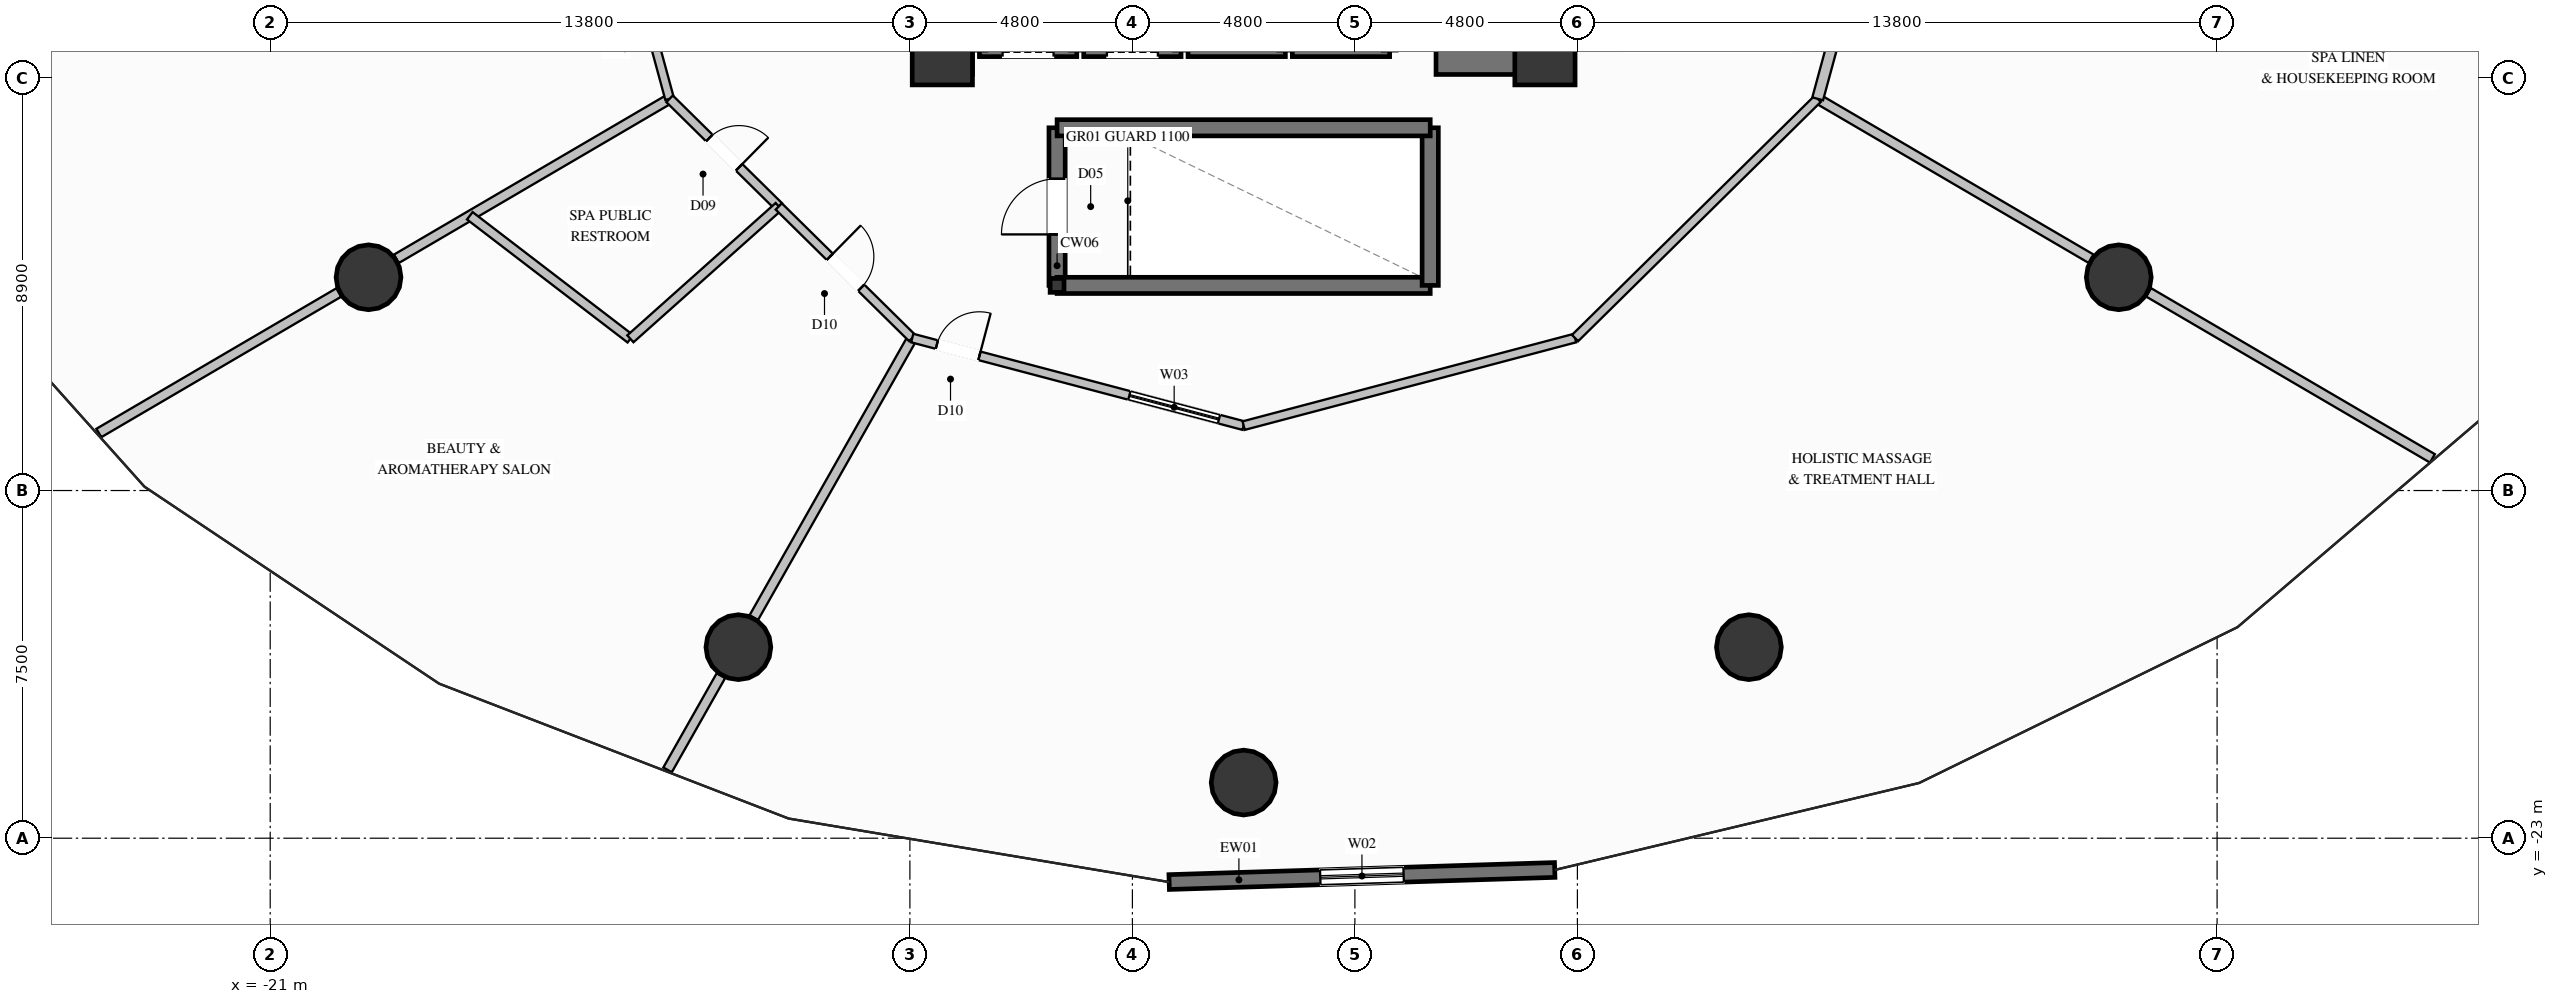
"""IFC4 building model, lengths in metres.
Left out: names, types, materials, properties, quantities, classifications, styles, units other than length and angle.
Written with IfcOpenShell. Run it as: python <this file> out.ifc"""

import sys

from ifc_helpers import new_model, si_unit, direction, frame, frame_2d, origin, origin_2d, place, context, subcontext, project, spatial, rectangle, hollow_rectangle, circle, extrude, element, fill, save


model = new_model("IFC4")
c1 = context("Model", 3, precision=1e-05, world=origin(), true_north=direction((0.0, 1.0)))
c2 = subcontext(c1, "Body", "Model", "MODEL_VIEW")
j1 = project(units=[si_unit("LENGTHUNIT", "METRE"), si_unit("PLANEANGLEUNIT", "RADIAN")], contexts=[c1])
p1 = place(None, origin())
s1 = spatial("IfcSite", under=j1, at=p1, CompositionType="ELEMENT")
p2 = place(p1, origin())
s2 = spatial("IfcBuilding", under=s1, at=p2, CompositionType="ELEMENT")
p3 = place(p2, frame((0.0, 0.0, 23.6)))
s3 = spatial("IfcBuildingStorey", under=s2, at=p3, CompositionType="ELEMENT", Elevation=23.6)
for number, where, z_axis, x_axis in (
    (1, (-6.5, -6.1, 0.0), (0.0, 0.0, 1.0), (1.0, 0.0, 0.0)),
    (2, (6.5, -6.1, 0.0), (0.0, 0.0, 1.0), (1.0, 0.0, 0.0)),
):
    element("IfcColumn", number, at=place(p3, frame(where, z_axis=z_axis, x_axis=x_axis)), inside=s3, PredefinedType="COLUMN", context=c2, shape_type="SweptSolid", body=[
        extrude(rectangle(XDim=1.3, YDim=1.3, at=origin_2d()), origin(), (0.0, 0.0, 1.0), 4.8),
    ])
p4 = place(p3, frame((-6.075, -6.1, 0.0), z_axis=(0.0, 0.0, 1.0), x_axis=(1.0, 0.0, 0.0)))
e3 = element("IfcWall", 3, at=p4, inside=s3, PredefinedType="SHEAR", context=c2, shape_type="SweptSolid", body=[
    extrude(rectangle(XDim=0.225, YDim=0.85, at=frame_2d((0.112, 0.0))), origin(), (0.0, 0.0, 1.0), 4.8),
])
p5 = place(p3, frame((4.15, -6.1, 0.0), z_axis=(0.0, 0.0, 1.0), x_axis=(1.0, 0.0, 0.0)))
e4 = element("IfcWall", 4, at=p5, inside=s3, PredefinedType="SHEAR", context=c2, shape_type="SweptSolid", body=[
    extrude(rectangle(XDim=1.925, YDim=0.85, at=frame_2d((0.962, 0.0))), origin(), (0.0, 0.0, 1.0), 4.8),
])
p6 = place(p3, frame((-6.5, -6.525, 0.0), z_axis=(0.0, 0.0, 1.0), x_axis=(0.0, 1.0, 0.0)))
e5 = element("IfcWall", 5, at=p6, inside=s3, PredefinedType="SHEAR", context=c2, shape_type="SweptSolid", body=[
    extrude(rectangle(XDim=3.175, YDim=0.85, at=frame_2d((1.587, 0.0))), origin(), (0.0, 0.0, 1.0), 4.8),
])
p7 = place(p3, frame((6.5, -6.525, 0.0), z_axis=(0.0, 0.0, 1.0), x_axis=(0.0, 1.0, 0.0)))
e6 = element("IfcWall", 6, at=p7, inside=s3, PredefinedType="SHEAR", context=c2, shape_type="SweptSolid", body=[
    extrude(rectangle(XDim=4.175, YDim=0.85, at=frame_2d((2.087, 0.0))), origin(), (0.0, 0.0, 1.0), 4.8),
])
p8 = place(p3, frame((-4.025, -11.075, 0.0), z_axis=(0.0, 0.0, 1.0), x_axis=(1.0, 0.0, 0.0)))
e7 = element("IfcColumn", 7, at=p8, inside=s3, PredefinedType="COLUMN", context=c2, shape_type="SweptSolid", body=[
    extrude(hollow_rectangle(XDim=0.3, YDim=0.3, WallThickness=0.016, at=origin_2d()), origin(), (0.0, 0.0, 1.0), 4.8),
])
for number, where, z_axis, x_axis in (
    (8, (-18.879, -10.9, 0.0), (0.0, 0.0, 1.0), (1.0, 0.0, 0.0)),
    (9, (-10.9, -18.879, 0.0), (0.0, 0.0, 1.0), (1.0, 0.0, 0.0)),
    (10, (0.0, -21.8, 0.0), (0.0, 0.0, 1.0), (1.0, 0.0, 0.0)),
    (11, (10.9, -18.879, 0.0), (0.0, 0.0, 1.0), (1.0, 0.0, 0.0)),
    (12, (18.879, -10.9, 0.0), (0.0, 0.0, 1.0), (1.0, 0.0, 0.0)),
):
    element("IfcColumn", number, at=place(p3, frame(where, z_axis=z_axis, x_axis=x_axis)), inside=s3, PredefinedType="COLUMN", context=c2, shape_type="SweptSolid", body=[
        extrude(circle(Radius=0.7, at=origin_2d()), origin(), (0.0, 0.0, 1.0), 4.8),
    ])
p9 = place(p3, frame((6.711, -23.685, 0.0), z_axis=(0.0, 0.0, 1.0), x_axis=(-0.999508118347, -0.031361144071, 0.0)))
e13 = element("IfcWall", 13, at=p9, inside=s3, PredefinedType="SOLIDWALL", context=c2, shape_type="SweptSolid", body=[
    extrude(rectangle(XDim=8.322, YDim=0.32, at=frame_2d((4.161, 0.0))), origin(), (0.0, 0.0, 1.0), 4.54),
])
p10 = place(p9, frame((3.261, 0.0, 0.65)))
e14 = element("IfcOpeningElement", 14, at=p10, cuts=e13, PredefinedType="OPENING", context=c2, shape_type="SweptSolid", body=[
    extrude(rectangle(XDim=1.8, YDim=2.6, at=frame_2d((0.9, 1.3))), frame((0.0, 0.17, 0.0), z_axis=(0.0, -1.0, 0.0), x_axis=(1.0, 0.0, 0.0)), (0.0, 0.0, 1.0), 0.34),
])
p11 = place(p3, frame((-5.7, -6.0, 0.0), z_axis=(0.0, 0.0, 1.0), x_axis=(1.0, 0.0, 0.0)))
e15 = element("IfcWall", 15, at=p11, inside=s3, PredefinedType="SOLIDWALL", context=c2, shape_type="SweptSolid", body=[
    extrude(rectangle(XDim=2.1, YDim=0.28, at=frame_2d((1.05, 0.0))), origin(), (0.0, 0.0, 1.0), 4.54),
])
p12 = place(p11, frame((0.5, 0.0, 0.0)))
e16 = element("IfcOpeningElement", 16, at=p12, cuts=e15, PredefinedType="OPENING", context=c2, shape_type="SweptSolid", body=[
    extrude(rectangle(XDim=1.1, YDim=2.2, at=frame_2d((0.55, 1.1))), frame((0.0, 0.15, 0.0), z_axis=(0.0, -1.0, 0.0), x_axis=(1.0, 0.0, 0.0)), (0.0, 0.0, 1.0), 0.3),
])
p13 = place(p3, frame((-3.45, -6.0, 0.0), z_axis=(0.0, 0.0, 1.0), x_axis=(1.0, 0.0, 0.0)))
e17 = element("IfcWall", 17, at=p13, inside=s3, PredefinedType="SOLIDWALL", context=c2, shape_type="SweptSolid", body=[
    extrude(rectangle(XDim=2.1, YDim=0.28, at=frame_2d((1.05, 0.0))), origin(), (0.0, 0.0, 1.0), 4.54),
])
p14 = place(p13, frame((0.5, 0.0, 0.0)))
e18 = element("IfcOpeningElement", 18, at=p14, cuts=e17, PredefinedType="OPENING", context=c2, shape_type="SweptSolid", body=[
    extrude(rectangle(XDim=1.1, YDim=2.2, at=frame_2d((0.55, 1.1))), frame((0.0, 0.15, 0.0), z_axis=(0.0, -1.0, 0.0), x_axis=(1.0, 0.0, 0.0)), (0.0, 0.0, 1.0), 0.3),
])
for number, where, z_axis, x_axis in (
    (19, (-1.2, -6.0, 0.0), (0.0, 0.0, 1.0), (1.0, 0.0, 0.0)),
    (20, (1.05, -6.0, 0.0), (0.0, 0.0, 1.0), (1.0, 0.0, 0.0)),
):
    element("IfcWall", number, at=place(p3, frame(where, z_axis=z_axis, x_axis=x_axis)), inside=s3, PredefinedType="SOLIDWALL", context=c2, shape_type="SweptSolid", body=[
        extrude(rectangle(XDim=2.1, YDim=0.28, at=frame_2d((1.05, 0.0))), origin(), (0.0, 0.0, 1.0), 4.54),
    ])
p15 = place(p3, frame((-4.025, -11.075, 0.0), z_axis=(0.0, 0.0, 1.0), x_axis=(0.0, 1.0, 0.0)))
e21 = element("IfcWall", 21, at=p15, inside=s3, PredefinedType="SOLIDWALL", context=c2, shape_type="SweptSolid", body=[
    extrude(rectangle(XDim=3.4, YDim=0.35, at=frame_2d((1.7, 0.0))), origin(), (0.0, 0.0, 1.0), 4.54),
])
p16 = place(p15, frame((1.1, 0.0, 0.0)))
e22 = element("IfcOpeningElement", 22, at=p16, cuts=e21, PredefinedType="OPENING", context=c2, shape_type="SweptSolid", body=[
    extrude(rectangle(XDim=1.2, YDim=2.2, at=frame_2d((0.6, 1.1))), frame((0.0, 0.185, 0.0), z_axis=(0.0, -1.0, 0.0), x_axis=(1.0, 0.0, 0.0)), (0.0, 0.0, 1.0), 0.37),
])
p17 = place(p3, frame((-4.025, -11.075, 0.0), z_axis=(0.0, 0.0, 1.0), x_axis=(1.0, 0.0, 0.0)))
e23 = element("IfcWall", 23, at=p17, inside=s3, PredefinedType="SOLIDWALL", context=c2, shape_type="SweptSolid", body=[
    extrude(rectangle(XDim=8.05, YDim=0.35, at=frame_2d((4.025, 0.0))), origin(), (0.0, 0.0, 1.0), 4.54),
])
p18 = place(p3, frame((4.025, -11.075, 0.0), z_axis=(0.0, 0.0, 1.0), x_axis=(0.0, 1.0, 0.0)))
e24 = element("IfcWall", 24, at=p18, inside=s3, PredefinedType="SOLIDWALL", context=c2, shape_type="SweptSolid", body=[
    extrude(rectangle(XDim=3.4, YDim=0.35, at=frame_2d((1.7, 0.0))), origin(), (0.0, 0.0, 1.0), 4.54),
])
p19 = place(p3, frame((4.025, -7.675, 0.0), z_axis=(0.0, 0.0, 1.0), x_axis=(-1.0, 0.0, 0.0)))
e25 = element("IfcWall", 25, at=p19, inside=s3, PredefinedType="SOLIDWALL", context=c2, shape_type="SweptSolid", body=[
    extrude(rectangle(XDim=8.05, YDim=0.35, at=frame_2d((4.025, 0.0))), origin(), (0.0, 0.0, 1.0), 4.54),
])
p20 = place(p3, frame((-12.384, -7.05, 0.0), z_axis=(0.0, 0.0, 1.0), x_axis=(-0.862940354658, -0.505305792865, 0.0)))
e26 = element("IfcWall", 26, at=p20, inside=s3, PredefinedType="PARTITIONING", context=c2, shape_type="SweptSolid", body=[
    extrude(rectangle(XDim=6.831, YDim=0.21, at=frame_2d((3.416, 0.0))), origin(), (0.0, 0.0, 1.0), 2.725),
])
p21 = place(p3, frame((-19.52, -11.228, 0.0), z_axis=(0.0, 0.0, 1.0), x_axis=(-0.862973355077, -0.505249431892, 0.0)))
e27 = element("IfcWall", 27, at=p21, inside=s3, PredefinedType="PARTITIONING", context=c2, shape_type="SweptSolid", body=[
    extrude(rectangle(XDim=5.999, YDim=0.21, at=frame_2d((3.0, 0.0))), origin(), (0.0, 0.0, 1.0), 4.54),
])
p22 = place(p3, frame((-7.15, -12.211, 0.0), z_axis=(0.0, 0.0, 1.0), x_axis=(-0.493009905658, -0.87002369676, 0.0)))
e28 = element("IfcWall", 28, at=p22, inside=s3, PredefinedType="PARTITIONING", context=c2, shape_type="SweptSolid", body=[
    extrude(rectangle(XDim=6.931, YDim=0.21, at=frame_2d((3.465, 0.0))), origin(), (0.0, 0.0, 1.0), 2.725),
])
p23 = place(p3, frame((-11.276, -19.493, 0.0), z_axis=(0.0, 0.0, 1.0), x_axis=(-0.493041569547, -0.870005753256, 0.0)))
e29 = element("IfcWall", 29, at=p23, inside=s3, PredefinedType="PARTITIONING", context=c2, shape_type="SweptSolid", body=[
    extrude(rectangle(XDim=2.337, YDim=0.21, at=frame_2d((1.168, 0.0))), origin(), (0.0, 0.0, 1.0), 4.54),
])
p24 = place(p3, frame((12.384, -7.05, 0.0), z_axis=(0.0, 0.0, 1.0), x_axis=(0.863200238908, -0.504861711313, 0.0)))
e30 = element("IfcWall", 30, at=p24, inside=s3, PredefinedType="PARTITIONING", context=c2, shape_type="SweptSolid", body=[
    extrude(rectangle(XDim=6.832, YDim=0.21, at=frame_2d((3.416, 0.0))), origin(), (0.0, 0.0, 1.0), 2.725),
])
p25 = place(p3, frame((19.522, -11.225, 0.0), z_axis=(0.0, 0.0, 1.0), x_axis=(0.863224110389, -0.504820894222, 0.0)))
e31 = element("IfcWall", 31, at=p25, inside=s3, PredefinedType="PARTITIONING", context=c2, shape_type="SweptSolid", body=[
    extrude(rectangle(XDim=7.093, YDim=0.21, at=frame_2d((3.547, 0.0))), origin(), (0.0, 0.0, 1.0), 4.54),
])
p26 = place(p3, frame((-13.438, -3.172, 0.0), z_axis=(0.0, 0.0, 1.0), x_axis=(0.262269103922, -0.9649947757, 0.0)))
e32 = element("IfcWall", 32, at=p26, inside=s3, PredefinedType="PARTITIONING", context=c2, shape_type="SweptSolid", body=[
    extrude(rectangle(XDim=4.019, YDim=0.19, at=frame_2d((2.009, 0.0))), origin(), (0.0, 0.0, 1.0), 4.54),
])
p27 = place(p26, frame((1.534, 0.0, 0.0)))
e33 = element("IfcOpeningElement", 33, at=p27, cuts=e32, PredefinedType="OPENING", context=c2, shape_type="SweptSolid", body=[
    extrude(rectangle(XDim=0.95, YDim=2.1, at=frame_2d((0.475, 1.05))), frame((0.0, 0.105, 0.0), z_axis=(0.0, -1.0, 0.0), x_axis=(1.0, 0.0, 0.0)), (0.0, 0.0, 1.0), 0.21),
])
p28 = place(p3, frame((-12.384, -7.05, 0.0), z_axis=(0.0, 0.0, 1.0), x_axis=(0.712072104827, -0.70210634346, 0.0)))
e34 = element("IfcWall", 34, at=p28, inside=s3, PredefinedType="PLUMBINGWALL", context=c2, shape_type="SweptSolid", body=[
    extrude(rectangle(XDim=3.307, YDim=0.2, at=frame_2d((1.654, 0.0))), origin(), (0.0, 0.0, 1.0), 4.54),
])
p29 = place(p28, frame((1.204, 0.0, 0.0)))
e35 = element("IfcOpeningElement", 35, at=p29, cuts=e34, PredefinedType="OPENING", context=c2, shape_type="SweptSolid", body=[
    extrude(rectangle(XDim=0.9, YDim=2.1, at=frame_2d((0.45, 1.05))), frame((0.0, 0.11, 0.0), z_axis=(0.0, -1.0, 0.0), x_axis=(1.0, 0.0, 0.0)), (0.0, 0.0, 1.0), 0.22),
])
p30 = place(p3, frame((-16.694, -9.573, 0.0), z_axis=(0.0, 0.0, 1.0), x_axis=(0.79380171633, -0.608176647983, 0.0)))
e36 = element("IfcWall", 36, at=p30, inside=s3, PredefinedType="PLUMBINGWALL", context=c2, shape_type="SweptSolid", body=[
    extrude(rectangle(XDim=4.364, YDim=0.2, at=frame_2d((2.182, 0.0))), origin(), (0.0, 0.0, 1.0), 4.54),
])
p31 = place(p3, frame((-10.029, -9.372, 0.0), z_axis=(0.0, 0.0, 1.0), x_axis=(-0.746283971534, -0.665627699117, 0.0)))
e37 = element("IfcWall", 37, at=p31, inside=s3, PredefinedType="PLUMBINGWALL", context=c2, shape_type="SweptSolid", body=[
    extrude(rectangle(XDim=4.289, YDim=0.2, at=frame_2d((2.145, 0.0))), origin(), (0.0, 0.0, 1.0), 4.54),
])
p32 = place(p3, frame((-10.029, -9.372, 0.0), z_axis=(0.0, 0.0, 1.0), x_axis=(0.712070649597, -0.702107819343, 0.0)))
e38 = element("IfcWall", 38, at=p32, inside=s3, PredefinedType="PARTITIONING", context=c2, shape_type="SweptSolid", body=[
    extrude(rectangle(XDim=4.043, YDim=0.19, at=frame_2d((2.022, 0.0))), origin(), (0.0, 0.0, 1.0), 4.54),
])
p33 = place(p32, frame((1.547, 0.0, 0.0)))
e39 = element("IfcOpeningElement", 39, at=p33, cuts=e38, PredefinedType="OPENING", context=c2, shape_type="SweptSolid", body=[
    extrude(rectangle(XDim=0.95, YDim=2.1, at=frame_2d((0.475, 1.05))), frame((0.0, 0.105, 0.0), z_axis=(0.0, -1.0, 0.0), x_axis=(1.0, 0.0, 0.0)), (0.0, 0.0, 1.0), 0.21),
])
p34 = place(p3, frame((-7.15, -12.211, 0.0), z_axis=(0.0, 0.0, 1.0), x_axis=(0.966820901533, -0.255455170937, 0.0)))
e40 = element("IfcWall", 40, at=p34, inside=s3, PredefinedType="PARTITIONING", context=c2, shape_type="SweptSolid", body=[
    extrude(rectangle(XDim=7.395, YDim=0.19, at=frame_2d((3.698, 0.0))), origin(), (0.0, 0.0, 1.0), 4.54),
])
p35 = place(p34, frame((0.55, 0.0, 0.0)))
e41 = element("IfcOpeningElement", 41, at=p35, cuts=e40, PredefinedType="OPENING", context=c2, shape_type="SweptSolid", body=[
    extrude(rectangle(XDim=0.95, YDim=2.1, at=frame_2d((0.475, 1.05))), frame((0.0, 0.105, 0.0), z_axis=(0.0, -1.0, 0.0), x_axis=(1.0, 0.0, 0.0)), (0.0, 0.0, 1.0), 0.21),
])
p36 = place(p34, frame((4.845, 0.0, 0.9)))
e42 = element("IfcOpeningElement", 42, at=p36, cuts=e40, PredefinedType="OPENING", context=c2, shape_type="SweptSolid", body=[
    extrude(rectangle(XDim=2.0, YDim=1.6, at=frame_2d((1.0, 0.8))), frame((0.0, 0.105, 0.0), z_axis=(0.0, -1.0, 0.0), x_axis=(1.0, 0.0, 0.0)), (0.0, 0.0, 1.0), 0.21),
])
p37 = place(p3, frame((0.0, -14.1, 0.0), z_axis=(0.0, 0.0, 1.0), x_axis=(0.966820901533, 0.255455170937, 0.0)))
e43 = element("IfcWall", 43, at=p37, inside=s3, PredefinedType="PARTITIONING", context=c2, shape_type="SweptSolid", body=[
    extrude(rectangle(XDim=7.395, YDim=0.19, at=frame_2d((3.698, 0.0))), origin(), (0.0, 0.0, 1.0), 4.54),
])
p38 = place(p3, frame((7.15, -12.211, 0.0), z_axis=(0.0, 0.0, 1.0), x_axis=(0.712071304345, 0.702107155303, 0.0)))
e44 = element("IfcWall", 44, at=p38, inside=s3, PredefinedType="PARTITIONING", context=c2, shape_type="SweptSolid", body=[
    extrude(rectangle(XDim=7.351, YDim=0.19, at=frame_2d((3.675, 0.0))), origin(), (0.0, 0.0, 1.0), 4.54),
])
p39 = place(p3, frame((12.384, -7.05, 0.0), z_axis=(0.0, 0.0, 1.0), x_axis=(0.262260528785, 0.964997106235, 0.0)))
e45 = element("IfcWall", 45, at=p39, inside=s3, PredefinedType="PARTITIONING", context=c2, shape_type="SweptSolid", body=[
    extrude(rectangle(XDim=7.306, YDim=0.24, at=frame_2d((3.653, 0.0))), origin(), (0.0, 0.0, 1.0), 4.54),
])
p40 = place(p39, frame((3.178, 0.0, 0.0)))
e46 = element("IfcOpeningElement", 46, at=p40, cuts=e45, PredefinedType="OPENING", context=c2, shape_type="SweptSolid", body=[
    extrude(rectangle(XDim=0.95, YDim=2.1, at=frame_2d((0.475, 1.05))), frame((0.0, 0.13, 0.0), z_axis=(0.0, -1.0, 0.0), x_axis=(1.0, 0.0, 0.0)), (0.0, 0.0, 1.0), 0.26),
])
p41 = place(p10, origin())
e47 = element("IfcWindow", 47, at=p41, inside=s3, PartitioningType="SINGLE_PANEL", PredefinedType="WINDOW", context=c2, shape_type="SweptSolid", body=[
    extrude(rectangle(XDim=1.8, YDim=2.6, at=frame_2d((0.9, 1.3))), frame((0.0, 0.03, 0.0), z_axis=(0.0, -1.0, 0.0), x_axis=(1.0, 0.0, 0.0)), (0.0, 0.0, 1.0), 0.06),
])
fill(e14, e47)
p42 = place(p16, origin())
e48 = element("IfcDoor", 48, at=p42, inside=s3, OperationType="SINGLE_SWING_LEFT", PredefinedType="DOOR", context=c2, shape_type="SweptSolid", body=[
    extrude(rectangle(XDim=1.2, YDim=2.2, at=frame_2d((0.6, 1.1))), frame((0.0, 0.025, 0.0), z_axis=(0.0, -1.0, 0.0), x_axis=(1.0, 0.0, 0.0)), (0.0, 0.0, 1.0), 0.05),
])
fill(e22, e48)
p43 = place(p29, origin())
e49 = element("IfcDoor", 49, at=p43, inside=s3, OperationType="SINGLE_SWING_RIGHT", PredefinedType="DOOR", context=c2, shape_type="SweptSolid", body=[
    extrude(rectangle(XDim=0.9, YDim=2.1, at=frame_2d((0.45, 1.05))), frame((0.0, 0.025, 0.0), z_axis=(0.0, -1.0, 0.0), x_axis=(1.0, 0.0, 0.0)), (0.0, 0.0, 1.0), 0.05),
])
fill(e35, e49)
p44 = place(p33, origin())
e50 = element("IfcDoor", 50, at=p44, inside=s3, OperationType="SINGLE_SWING_LEFT", PredefinedType="DOOR", context=c2, shape_type="SweptSolid", body=[
    extrude(rectangle(XDim=0.95, YDim=2.1, at=frame_2d((0.475, 1.05))), frame((0.0, 0.025, 0.0), z_axis=(0.0, -1.0, 0.0), x_axis=(1.0, 0.0, 0.0)), (0.0, 0.0, 1.0), 0.05),
])
fill(e39, e50)
p45 = place(p35, origin())
e51 = element("IfcDoor", 51, at=p45, inside=s3, OperationType="SINGLE_SWING_RIGHT", PredefinedType="DOOR", context=c2, shape_type="SweptSolid", body=[
    extrude(rectangle(XDim=0.95, YDim=2.1, at=frame_2d((0.475, 1.05))), frame((0.0, 0.025, 0.0), z_axis=(0.0, -1.0, 0.0), x_axis=(1.0, 0.0, 0.0)), (0.0, 0.0, 1.0), 0.05),
])
fill(e41, e51)
p46 = place(p36, origin())
e52 = element("IfcWindow", 52, at=p46, inside=s3, PartitioningType="SINGLE_PANEL", PredefinedType="WINDOW", context=c2, shape_type="SweptSolid", body=[
    extrude(rectangle(XDim=2.0, YDim=1.6, at=frame_2d((1.0, 0.8))), frame((0.0, 0.03, 0.0), z_axis=(0.0, -1.0, 0.0), x_axis=(1.0, 0.0, 0.0)), (0.0, 0.0, 1.0), 0.06),
])
fill(e42, e52)
save(model, sys.argv[1])
